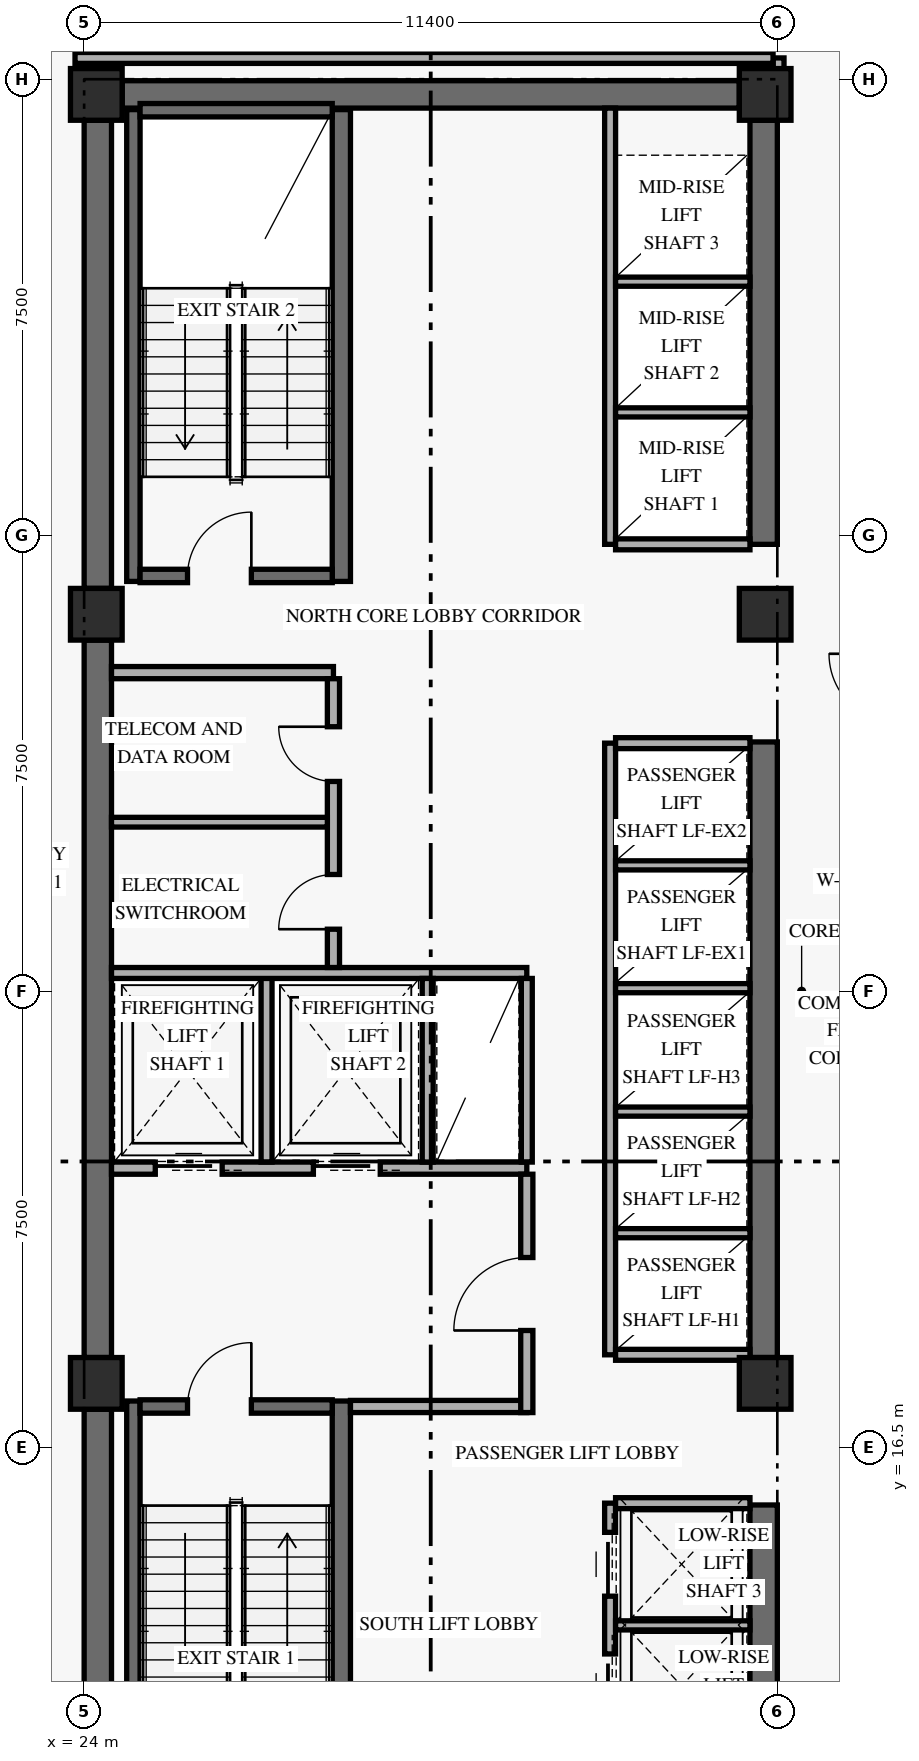
"""IFC4 building model, lengths in metres.
Left out: names, types, materials, properties, quantities, classifications, styles, units other than length and angle.
Written with IfcOpenShell. Run it as: python <this file> out.ifc"""

import sys

from ifc_helpers import new_model, si_unit, direction, frame, frame_2d, origin, origin_2d, place, context, subcontext, project, spatial, rectangle, extrude, element, fill, save


model = new_model("IFC4")
c1 = context("Model", 3, precision=1e-05, world=origin(), true_north=direction((0.0, 1.0)))
c2 = subcontext(c1, "Body", "Model", "MODEL_VIEW")
j1 = project(units=[si_unit("LENGTHUNIT", "METRE"), si_unit("PLANEANGLEUNIT", "RADIAN")], contexts=[c1])
p1 = place(None, origin())
s1 = spatial("IfcSite", under=j1, at=p1, CompositionType="ELEMENT")
p2 = place(p1, origin())
s2 = spatial("IfcBuilding", under=s1, at=p2, CompositionType="ELEMENT")
p3 = place(p2, frame((0.0, 0.0, 60.0)))
s3 = spatial("IfcBuildingStorey", under=s2, at=p3, CompositionType="ELEMENT", Elevation=60.0)
p4 = place(p3, frame((24.225, 9.675, 0.0), z_axis=(0.0, 0.0, 1.0), x_axis=(0.0, 1.0, 0.0)))
e1 = element("IfcWall", 1, at=p4, inside=s3, PredefinedType="SHEAR", context=c2, shape_type="SweptSolid", body=[
    extrude(rectangle(XDim=7.45, YDim=0.45, at=frame_2d((3.725, 0.0))), origin(), (0.0, 0.0, 1.0), 3.267),
])
p5 = place(p3, frame((24.225, 17.975, 0.0), z_axis=(0.0, 0.0, 1.0), x_axis=(0.0, 1.0, 0.0)))
e2 = element("IfcWall", 2, at=p5, inside=s3, PredefinedType="SHEAR", context=c2, shape_type="SweptSolid", body=[
    extrude(rectangle(XDim=11.8, YDim=0.45, at=frame_2d((5.9, 0.0))), origin(), (0.0, 0.0, 1.0), 3.267),
])
p6 = place(p3, frame((24.225, 30.625, 0.0), z_axis=(0.0, 0.0, 1.0), x_axis=(0.0, 1.0, 0.0)))
e3 = element("IfcWall", 3, at=p6, inside=s3, PredefinedType="SHEAR", context=c2, shape_type="SweptSolid", body=[
    extrude(rectangle(XDim=7.7, YDim=0.45, at=frame_2d((3.85, 0.0))), origin(), (0.0, 0.0, 1.0), 3.267),
])
p7 = place(p3, frame((35.175, 9.675, 0.0), z_axis=(0.0, 0.0, 1.0), x_axis=(0.0, 1.0, 0.0)))
e4 = element("IfcWall", 4, at=p7, inside=s3, PredefinedType="SHEAR", context=c2, shape_type="SweptSolid", body=[
    extrude(rectangle(XDim=5.875, YDim=0.45, at=frame_2d((2.938, 0.0))), origin(), (0.0, 0.0, 1.0), 3.267),
])
p8 = place(p3, frame((35.175, 17.975, 0.0), z_axis=(0.0, 0.0, 1.0), x_axis=(0.0, 1.0, 0.0)))
e5 = element("IfcWall", 5, at=p8, inside=s3, PredefinedType="SHEAR", context=c2, shape_type="SweptSolid", body=[
    extrude(rectangle(XDim=10.125, YDim=0.45, at=frame_2d((5.062, 0.0))), origin(), (0.0, 0.0, 1.0), 3.267),
])
p9 = place(p3, frame((35.175, 31.35, 0.0), z_axis=(0.0, 0.0, 1.0), x_axis=(0.0, 1.0, 0.0)))
e6 = element("IfcWall", 6, at=p9, inside=s3, PredefinedType="SHEAR", context=c2, shape_type="SweptSolid", body=[
    extrude(rectangle(XDim=6.975, YDim=0.45, at=frame_2d((3.487, 0.0))), origin(), (0.0, 0.0, 1.0), 3.267),
])
p10 = place(p3, frame((24.625, 38.75, 0.0), z_axis=(0.0, 0.0, 1.0), x_axis=(1.0, 0.0, 0.0)))
e7 = element("IfcWall", 7, at=p10, inside=s3, PredefinedType="SHEAR", context=c2, shape_type="SweptSolid", body=[
    extrude(rectangle(XDim=10.15, YDim=0.45, at=frame_2d((5.075, 0.0))), origin(), (0.0, 0.0, 1.0), 3.96),
])
p11 = place(p3, frame((24.81, 9.5, 0.0), z_axis=(0.0, 0.0, 1.0), x_axis=(0.0, 1.0, 0.0)))
e8 = element("IfcWall", 8, at=p11, inside=s3, PredefinedType="SHEAR", context=c2, shape_type="SweptSolid", body=[
    extrude(rectangle(XDim=7.76, YDim=0.22, at=frame_2d((3.88, 0.0))), origin(), (0.0, 0.0, 1.0), 3.96),
])
p12 = place(p3, frame((28.23, 9.5, 0.0), z_axis=(0.0, 0.0, 1.0), x_axis=(0.0, 1.0, 0.0)))
e9 = element("IfcWall", 9, at=p12, inside=s3, PredefinedType="SHEAR", context=c2, shape_type="SweptSolid", body=[
    extrude(rectangle(XDim=7.76, YDim=0.3, at=frame_2d((3.88, 0.0))), origin(), (0.0, 0.0, 1.0), 3.96),
])
p13 = place(p3, frame((24.92, 17.17, 0.0), z_axis=(0.0, 0.0, 1.0), x_axis=(1.0, 0.0, 0.0)))
e10 = element("IfcWall", 10, at=p13, inside=s3, PredefinedType="SHEAR", context=c2, shape_type="SweptSolid", body=[
    extrude(rectangle(XDim=3.16, YDim=0.22, at=frame_2d((1.58, 0.0))), origin(), (0.0, 0.0, 1.0), 3.96),
])
p14 = place(p13, frame((0.78, 0.0, 0.0)))
e11 = element("IfcOpeningElement", 11, at=p14, cuts=e10, PredefinedType="OPENING", context=c2, shape_type="SweptSolid", body=[
    extrude(rectangle(XDim=1.05, YDim=2.15, at=frame_2d((0.525, 1.075))), frame((0.0, 0.12, 0.0), z_axis=(0.0, -1.0, 0.0), x_axis=(1.0, 0.0, 0.0)), (0.0, 0.0, 1.0), 0.24),
])
p15 = place(p3, frame((24.81, 30.74, 0.0), z_axis=(0.0, 0.0, 1.0), x_axis=(0.0, 1.0, 0.0)))
e12 = element("IfcWall", 12, at=p15, inside=s3, PredefinedType="SHEAR", context=c2, shape_type="SweptSolid", body=[
    extrude(rectangle(XDim=7.76, YDim=0.22, at=frame_2d((3.88, 0.0))), origin(), (0.0, 0.0, 1.0), 3.96),
])
p16 = place(p3, frame((28.23, 30.74, 0.0), z_axis=(0.0, 0.0, 1.0), x_axis=(0.0, 1.0, 0.0)))
e13 = element("IfcWall", 13, at=p16, inside=s3, PredefinedType="SHEAR", context=c2, shape_type="SweptSolid", body=[
    extrude(rectangle(XDim=7.76, YDim=0.3, at=frame_2d((3.88, 0.0))), origin(), (0.0, 0.0, 1.0), 3.96),
])
p17 = place(p3, frame((24.92, 30.83, 0.0), z_axis=(0.0, 0.0, 1.0), x_axis=(1.0, 0.0, 0.0)))
e14 = element("IfcWall", 14, at=p17, inside=s3, PredefinedType="SHEAR", context=c2, shape_type="SweptSolid", body=[
    extrude(rectangle(XDim=3.16, YDim=0.22, at=frame_2d((1.58, 0.0))), origin(), (0.0, 0.0, 1.0), 3.96),
])
p18 = place(p17, frame((0.78, 0.0, 0.0)))
e15 = element("IfcOpeningElement", 15, at=p18, cuts=e14, PredefinedType="OPENING", context=c2, shape_type="SweptSolid", body=[
    extrude(rectangle(XDim=1.05, YDim=2.15, at=frame_2d((0.525, 1.075))), frame((0.0, 0.12, 0.0), z_axis=(0.0, -1.0, 0.0), x_axis=(1.0, 0.0, 0.0)), (0.0, 0.0, 1.0), 0.24),
])
p19 = place(p3, frame((24.92, 38.49, 0.0), z_axis=(0.0, 0.0, 1.0), x_axis=(1.0, 0.0, 0.0)))
e16 = element("IfcWall", 16, at=p19, inside=s3, PredefinedType="SHEAR", context=c2, shape_type="SweptSolid", body=[
    extrude(rectangle(XDim=3.16, YDim=0.22, at=frame_2d((1.58, 0.0))), origin(), (0.0, 0.0, 1.0), 3.96),
])
for number, where, z_axis, x_axis in (
    (17, (24.2, 17.55, 0.0), (0.0, 0.0, 1.0), (1.0, 0.0, 0.0)),
    (18, (24.2, 30.2, 0.0), (0.0, 0.0, 1.0), (1.0, 0.0, 0.0)),
    (19, (24.2, 38.75, 0.0), (0.0, 0.0, 1.0), (1.0, 0.0, 0.0)),
    (20, (35.2, 17.55, 0.0), (0.0, 0.0, 1.0), (1.0, 0.0, 0.0)),
    (21, (35.2, 30.2, 0.0), (0.0, 0.0, 1.0), (1.0, 0.0, 0.0)),
    (22, (35.2, 38.75, 0.0), (0.0, 0.0, 1.0), (1.0, 0.0, 0.0)),
):
    element("IfcColumn", number, at=place(p3, frame(where, z_axis=z_axis, x_axis=x_axis)), inside=s3, PredefinedType="COLUMN", context=c2, shape_type="SweptSolid", body=[
        extrude(rectangle(XDim=0.85, YDim=0.85, at=origin_2d()), origin(), (0.0, 0.0, 1.0), 4.2),
    ])
p20 = place(p3, frame((24.45, 21.09, 0.0), z_axis=(0.0, 0.0, 1.0), x_axis=(1.0, 0.0, 0.0)))
e23 = element("IfcWall", 23, at=p20, inside=s3, PredefinedType="STANDARD", context=c2, shape_type="SweptSolid", body=[
    extrude(rectangle(XDim=6.83, YDim=0.2, at=frame_2d((3.415, 0.0))), origin(), (0.0, 0.0, 1.0), 3.96),
])
p21 = place(p20, frame((0.72, 0.0, 0.0)))
e24 = element("IfcOpeningElement", 24, at=p21, cuts=e23, PredefinedType="OPENING", context=c2, shape_type="SweptSolid", body=[
    extrude(rectangle(XDim=1.1, YDim=2.2, at=frame_2d((0.55, 1.1))), frame((0.0, 0.11, 0.0), z_axis=(0.0, -1.0, 0.0), x_axis=(1.0, 0.0, 0.0)), (0.0, 0.0, 1.0), 0.22),
])
p22 = place(p20, frame((3.32, 0.0, 0.0)))
e25 = element("IfcOpeningElement", 25, at=p22, cuts=e23, PredefinedType="OPENING", context=c2, shape_type="SweptSolid", body=[
    extrude(rectangle(XDim=1.1, YDim=2.2, at=frame_2d((0.55, 1.1))), frame((0.0, 0.11, 0.0), z_axis=(0.0, -1.0, 0.0), x_axis=(1.0, 0.0, 0.0)), (0.0, 0.0, 1.0), 0.22),
])
p23 = place(p3, frame((28.38, 17.17, 0.0), z_axis=(0.0, 0.0, 1.0), x_axis=(1.0, 0.0, 0.0)))
e26 = element("IfcWall", 26, at=p23, inside=s3, PredefinedType="STANDARD", context=c2, shape_type="SweptSolid", body=[
    extrude(rectangle(XDim=2.9, YDim=0.2, at=frame_2d((1.45, 0.0))), origin(), (0.0, 0.0, 1.0), 3.96),
])
p24 = place(p3, frame((31.28, 17.07, 0.0), z_axis=(0.0, 0.0, 1.0), x_axis=(0.0, 1.0, 0.0)))
e27 = element("IfcWall", 27, at=p24, inside=s3, PredefinedType="STANDARD", context=c2, shape_type="SweptSolid", body=[
    extrude(rectangle(XDim=3.92, YDim=0.2, at=frame_2d((1.96, 0.0))), origin(), (0.0, 0.0, 1.0), 3.249),
])
p25 = place(p24, frame((1.35, 0.0, 0.0)))
e28 = element("IfcOpeningElement", 28, at=p25, cuts=e27, PredefinedType="OPENING", context=c2, shape_type="SweptSolid", body=[
    extrude(rectangle(XDim=1.2, YDim=2.15, at=frame_2d((0.6, 1.075))), frame((0.0, 0.11, 0.0), z_axis=(0.0, -1.0, 0.0), x_axis=(1.0, 0.0, 0.0)), (0.0, 0.0, 1.0), 0.22),
])
p26 = place(p3, frame((27.0, 21.19, 0.0), z_axis=(0.0, 0.0, 1.0), x_axis=(0.0, 1.0, 0.0)))
e29 = element("IfcWall", 29, at=p26, inside=s3, PredefinedType="STANDARD", context=c2, shape_type="SweptSolid", body=[
    extrude(rectangle(XDim=3.11, YDim=0.18, at=frame_2d((1.555, 0.0))), origin(), (0.0, 0.0, 1.0), 3.96),
])
p27 = place(p3, frame((24.45, 24.3, 0.0), z_axis=(0.0, 0.0, 1.0), x_axis=(1.0, 0.0, 0.0)))
e30 = element("IfcWall", 30, at=p27, inside=s3, PredefinedType="STANDARD", context=c2, shape_type="SweptSolid", body=[
    extrude(rectangle(XDim=6.83, YDim=0.18, at=frame_2d((3.415, 0.0))), origin(), (0.0, 0.0, 1.0), 3.96),
])
for number, where, z_axis, x_axis in (
    (31, (29.65, 21.19, 0.0), (0.0, 0.0, 1.0), (0.0, 1.0, 0.0)),
    (32, (31.28, 21.19, 0.0), (0.0, 0.0, 1.0), (0.0, 1.0, 0.0)),
):
    element("IfcWall", number, at=place(p3, frame(where, z_axis=z_axis, x_axis=x_axis)), inside=s3, PredefinedType="STANDARD", context=c2, shape_type="SweptSolid", body=[
        extrude(rectangle(XDim=3.02, YDim=0.18, at=frame_2d((1.51, 0.0))), origin(), (0.0, 0.0, 1.0), 3.96),
    ])
p28 = place(p3, frame((24.45, 29.24, 0.0), z_axis=(0.0, 0.0, 1.0), x_axis=(1.0, 0.0, 0.0)))
e33 = element("IfcWall", 33, at=p28, inside=s3, PredefinedType="STANDARD", context=c2, shape_type="SweptSolid", body=[
    extrude(rectangle(XDim=3.65, YDim=0.2, at=frame_2d((1.825, 0.0))), origin(), (0.0, 0.0, 1.0), 3.96),
])
p29 = place(p3, frame((28.1, 24.39, 0.0), z_axis=(0.0, 0.0, 1.0), x_axis=(0.0, 1.0, 0.0)))
e34 = element("IfcWall", 34, at=p29, inside=s3, PredefinedType="STANDARD", context=c2, shape_type="SweptSolid", body=[
    extrude(rectangle(XDim=4.75, YDim=0.2, at=frame_2d((2.375, 0.0))), origin(), (0.0, 0.0, 1.0), 3.96),
])
p30 = place(p29, frame((0.63, 0.0, 0.0)))
e35 = element("IfcOpeningElement", 35, at=p30, cuts=e34, PredefinedType="OPENING", context=c2, shape_type="SweptSolid", body=[
    extrude(rectangle(XDim=0.9, YDim=2.1, at=frame_2d((0.45, 1.05))), frame((0.0, 0.11, 0.0), z_axis=(0.0, -1.0, 0.0), x_axis=(1.0, 0.0, 0.0)), (0.0, 0.0, 1.0), 0.22),
])
p31 = place(p29, frame((3.06, 0.0, 0.0)))
e36 = element("IfcOpeningElement", 36, at=p31, cuts=e34, PredefinedType="OPENING", context=c2, shape_type="SweptSolid", body=[
    extrude(rectangle(XDim=0.9, YDim=2.1, at=frame_2d((0.45, 1.05))), frame((0.0, 0.11, 0.0), z_axis=(0.0, -1.0, 0.0), x_axis=(1.0, 0.0, 0.0)), (0.0, 0.0, 1.0), 0.22),
])
p32 = place(p3, frame((24.45, 26.78, 0.0), z_axis=(0.0, 0.0, 1.0), x_axis=(1.0, 0.0, 0.0)))
e37 = element("IfcWall", 37, at=p32, inside=s3, PredefinedType="PARTITIONING", context=c2, shape_type="SweptSolid", body=[
    extrude(rectangle(XDim=3.55, YDim=0.16, at=frame_2d((1.775, 0.0))), origin(), (0.0, 0.0, 1.0), 3.96),
])
p33 = place(p3, frame((32.65, 9.5, 0.0), z_axis=(0.0, 0.0, 1.0), x_axis=(0.0, 1.0, 0.0)))
e38 = element("IfcWall", 38, at=p33, inside=s3, PredefinedType="STANDARD", context=c2, shape_type="SweptSolid", body=[
    extrude(rectangle(XDim=6.08, YDim=0.18, at=frame_2d((3.04, 0.0))), origin(), (0.0, 0.0, 1.0), 3.96),
])
p34 = place(p33, frame((0.55, 0.0, 0.0)))
e39 = element("IfcOpeningElement", 39, at=p34, cuts=e38, PredefinedType="OPENING", context=c2, shape_type="SweptSolid", body=[
    extrude(rectangle(XDim=1.05, YDim=2.2, at=frame_2d((0.525, 1.1))), frame((0.0, 0.1, 0.0), z_axis=(0.0, -1.0, 0.0), x_axis=(1.0, 0.0, 0.0)), (0.0, 0.0, 1.0), 0.2),
])
p35 = place(p33, frame((2.55, 0.0, 0.0)))
e40 = element("IfcOpeningElement", 40, at=p35, cuts=e38, PredefinedType="OPENING", context=c2, shape_type="SweptSolid", body=[
    extrude(rectangle(XDim=1.05, YDim=2.2, at=frame_2d((0.525, 1.1))), frame((0.0, 0.1, 0.0), z_axis=(0.0, -1.0, 0.0), x_axis=(1.0, 0.0, 0.0)), (0.0, 0.0, 1.0), 0.2),
])
p36 = place(p33, frame((4.55, 0.0, 0.0)))
e41 = element("IfcOpeningElement", 41, at=p36, cuts=e38, PredefinedType="OPENING", context=c2, shape_type="SweptSolid", body=[
    extrude(rectangle(XDim=1.05, YDim=2.2, at=frame_2d((0.525, 1.1))), frame((0.0, 0.1, 0.0), z_axis=(0.0, -1.0, 0.0), x_axis=(1.0, 0.0, 0.0)), (0.0, 0.0, 1.0), 0.2),
])
p37 = place(p3, frame((32.74, 15.58, 0.0), z_axis=(0.0, 0.0, 1.0), x_axis=(1.0, 0.0, 0.0)))
e42 = element("IfcWall", 42, at=p37, inside=s3, PredefinedType="STANDARD", context=c2, shape_type="SweptSolid", body=[
    extrude(rectangle(XDim=2.21, YDim=0.18, at=frame_2d((1.105, 0.0))), origin(), (0.0, 0.0, 1.0), 3.96),
])
p38 = place(p3, frame((32.74, 13.57, 0.0), z_axis=(0.0, 0.0, 1.0), x_axis=(1.0, 0.0, 0.0)))
e43 = element("IfcWall", 43, at=p38, inside=s3, PredefinedType="STANDARD", context=c2, shape_type="SweptSolid", body=[
    extrude(rectangle(XDim=2.21, YDim=0.15, at=frame_2d((1.105, 0.0))), origin(), (0.0, 0.0, 1.0), 3.96),
])
p39 = place(p3, frame((32.65, 18.02, 0.0), z_axis=(0.0, 0.0, 1.0), x_axis=(0.0, 1.0, 0.0)))
e44 = element("IfcWall", 44, at=p39, inside=s3, PredefinedType="STANDARD", context=c2, shape_type="SweptSolid", body=[
    extrude(rectangle(XDim=10.06, YDim=0.18, at=frame_2d((5.03, 0.0))), origin(), (0.0, 0.0, 1.0), 3.96),
])
for number, where, z_axis, x_axis in (
    (45, (32.74, 18.02, 0.0), (0.0, 0.0, 1.0), (1.0, 0.0, 0.0)),
    (46, (32.74, 28.08, 0.0), (0.0, 0.0, 1.0), (1.0, 0.0, 0.0)),
):
    element("IfcWall", number, at=place(p3, frame(where, z_axis=z_axis, x_axis=x_axis)), inside=s3, PredefinedType="STANDARD", context=c2, shape_type="SweptSolid", body=[
        extrude(rectangle(XDim=2.21, YDim=0.18, at=frame_2d((1.105, 0.0))), origin(), (0.0, 0.0, 1.0), 3.96),
    ])
for number, where, z_axis, x_axis in (
    (47, (32.74, 20.02, 0.0), (0.0, 0.0, 1.0), (1.0, 0.0, 0.0)),
    (48, (32.74, 22.02, 0.0), (0.0, 0.0, 1.0), (1.0, 0.0, 0.0)),
    (49, (32.74, 24.05, 0.0), (0.0, 0.0, 1.0), (1.0, 0.0, 0.0)),
    (50, (32.74, 26.07, 0.0), (0.0, 0.0, 1.0), (1.0, 0.0, 0.0)),
):
    element("IfcWall", number, at=place(p3, frame(where, z_axis=z_axis, x_axis=x_axis)), inside=s3, PredefinedType="STANDARD", context=c2, shape_type="SweptSolid", body=[
        extrude(rectangle(XDim=2.21, YDim=0.15, at=frame_2d((1.105, 0.0))), origin(), (0.0, 0.0, 1.0), 3.96),
    ])
p40 = place(p3, frame((32.65, 31.35, 0.0), z_axis=(0.0, 0.0, 1.0), x_axis=(0.0, 1.0, 0.0)))
e51 = element("IfcWall", 51, at=p40, inside=s3, PredefinedType="STANDARD", context=c2, shape_type="SweptSolid", body=[
    extrude(rectangle(XDim=7.175, YDim=0.18, at=frame_2d((3.587, 0.0))), origin(), (0.0, 0.0, 1.0), 3.96),
])
p41 = place(p3, frame((32.74, 31.35, 0.0), z_axis=(0.0, 0.0, 1.0), x_axis=(1.0, 0.0, 0.0)))
e52 = element("IfcWall", 52, at=p41, inside=s3, PredefinedType="STANDARD", context=c2, shape_type="SweptSolid", body=[
    extrude(rectangle(XDim=2.21, YDim=0.18, at=frame_2d((1.105, 0.0))), origin(), (0.0, 0.0, 1.0), 3.96),
])
for number, where, z_axis, x_axis in (
    (53, (32.74, 33.52, 0.0), (0.0, 0.0, 1.0), (1.0, 0.0, 0.0)),
    (54, (32.74, 35.67, 0.0), (0.0, 0.0, 1.0), (1.0, 0.0, 0.0)),
):
    element("IfcWall", number, at=place(p3, frame(where, z_axis=z_axis, x_axis=x_axis)), inside=s3, PredefinedType="STANDARD", context=c2, shape_type="SweptSolid", body=[
        extrude(rectangle(XDim=2.21, YDim=0.15, at=frame_2d((1.105, 0.0))), origin(), (0.0, 0.0, 1.0), 3.96),
    ])
p42 = place(p3, frame((35.42, 38.75, 0.0), z_axis=(0.0, 0.0, 1.0), x_axis=(0.0, 1.0, 0.0)))
e55 = element("IfcWall", 55, at=p42, inside=s3, PredefinedType="STANDARD", context=c2, shape_type="SweptSolid", body=[
    extrude(rectangle(XDim=0.6, YDim=0.18, at=frame_2d((0.3, 0.0))), origin(), (0.0, 0.0, 1.0), 3.249),
])
p43 = place(p3, frame((23.85, 39.35, 0.0), z_axis=(0.0, 0.0, 1.0), x_axis=(1.0, 0.0, 0.0)))
e56 = element("IfcWall", 56, at=p43, inside=s3, PredefinedType="STANDARD", context=c2, shape_type="SweptSolid", body=[
    extrude(rectangle(XDim=11.48, YDim=0.18, at=frame_2d((5.74, 0.0))), origin(), (0.0, 0.0, 1.0), 3.249),
])
p44 = place(p14, frame((1.05, 0.0, 0.0), z_axis=(0.0, 0.0, 1.0), x_axis=(-1.0, 0.0, 0.0)))
e57 = element("IfcDoor", 57, at=p44, inside=s3, OperationType="SINGLE_SWING_LEFT", PredefinedType="DOOR", context=c2, shape_type="SweptSolid", body=[
    extrude(rectangle(XDim=1.05, YDim=2.15, at=frame_2d((0.525, 1.075))), frame((0.0, 0.025, 0.0), z_axis=(0.0, -1.0, 0.0), x_axis=(1.0, 0.0, 0.0)), (0.0, 0.0, 1.0), 0.05),
])
fill(e11, e57)
p45 = place(p18, origin())
e58 = element("IfcDoor", 58, at=p45, inside=s3, OperationType="SINGLE_SWING_RIGHT", PredefinedType="DOOR", context=c2, shape_type="SweptSolid", body=[
    extrude(rectangle(XDim=1.05, YDim=2.15, at=frame_2d((0.525, 1.075))), frame((0.0, 0.025, 0.0), z_axis=(0.0, -1.0, 0.0), x_axis=(1.0, 0.0, 0.0)), (0.0, 0.0, 1.0), 0.05),
])
fill(e15, e58)
p46 = place(p21, origin())
e59 = element("IfcDoor", 59, at=p46, inside=s3, OperationType="SLIDING_TO_LEFT", PredefinedType="DOOR", context=c2, shape_type="SweptSolid", body=[
    extrude(rectangle(XDim=1.1, YDim=2.2, at=frame_2d((0.55, 1.1))), frame((0.0, 0.025, 0.0), z_axis=(0.0, -1.0, 0.0), x_axis=(1.0, 0.0, 0.0)), (0.0, 0.0, 1.0), 0.05),
])
fill(e24, e59)
p47 = place(p22, origin())
e60 = element("IfcDoor", 60, at=p47, inside=s3, OperationType="SLIDING_TO_LEFT", PredefinedType="DOOR", context=c2, shape_type="SweptSolid", body=[
    extrude(rectangle(XDim=1.1, YDim=2.2, at=frame_2d((0.55, 1.1))), frame((0.0, 0.025, 0.0), z_axis=(0.0, -1.0, 0.0), x_axis=(1.0, 0.0, 0.0)), (0.0, 0.0, 1.0), 0.05),
])
fill(e25, e60)
p48 = place(p25, origin())
e61 = element("IfcDoor", 61, at=p48, inside=s3, OperationType="SINGLE_SWING_LEFT", PredefinedType="DOOR", context=c2, shape_type="SweptSolid", body=[
    extrude(rectangle(XDim=1.2, YDim=2.15, at=frame_2d((0.6, 1.075))), frame((0.0, 0.025, 0.0), z_axis=(0.0, -1.0, 0.0), x_axis=(1.0, 0.0, 0.0)), (0.0, 0.0, 1.0), 0.05),
])
fill(e28, e61)
p49 = place(p30, origin())
e62 = element("IfcDoor", 62, at=p49, inside=s3, OperationType="SINGLE_SWING_LEFT", PredefinedType="DOOR", context=c2, shape_type="SweptSolid", body=[
    extrude(rectangle(XDim=0.9, YDim=2.1, at=frame_2d((0.45, 1.05))), frame((0.0, 0.025, 0.0), z_axis=(0.0, -1.0, 0.0), x_axis=(1.0, 0.0, 0.0)), (0.0, 0.0, 1.0), 0.05),
])
fill(e35, e62)
p50 = place(p31, origin())
e63 = element("IfcDoor", 63, at=p50, inside=s3, OperationType="SINGLE_SWING_RIGHT", PredefinedType="DOOR", context=c2, shape_type="SweptSolid", body=[
    extrude(rectangle(XDim=0.9, YDim=2.1, at=frame_2d((0.45, 1.05))), frame((0.0, 0.025, 0.0), z_axis=(0.0, -1.0, 0.0), x_axis=(1.0, 0.0, 0.0)), (0.0, 0.0, 1.0), 0.05),
])
fill(e36, e63)
p51 = place(p35, origin())
e64 = element("IfcDoor", 64, at=p51, inside=s3, OperationType="SLIDING_TO_LEFT", PredefinedType="DOOR", context=c2, shape_type="SweptSolid", body=[
    extrude(rectangle(XDim=1.05, YDim=2.2, at=frame_2d((0.525, 1.1))), frame((0.0, 0.025, 0.0), z_axis=(0.0, -1.0, 0.0), x_axis=(1.0, 0.0, 0.0)), (0.0, 0.0, 1.0), 0.05),
])
fill(e40, e64)
p52 = place(p36, origin())
e65 = element("IfcDoor", 65, at=p52, inside=s3, OperationType="SLIDING_TO_LEFT", PredefinedType="DOOR", context=c2, shape_type="SweptSolid", body=[
    extrude(rectangle(XDim=1.05, YDim=2.2, at=frame_2d((0.525, 1.1))), frame((0.0, 0.025, 0.0), z_axis=(0.0, -1.0, 0.0), x_axis=(1.0, 0.0, 0.0)), (0.0, 0.0, 1.0), 0.05),
])
fill(e41, e65)
save(model, sys.argv[1])
